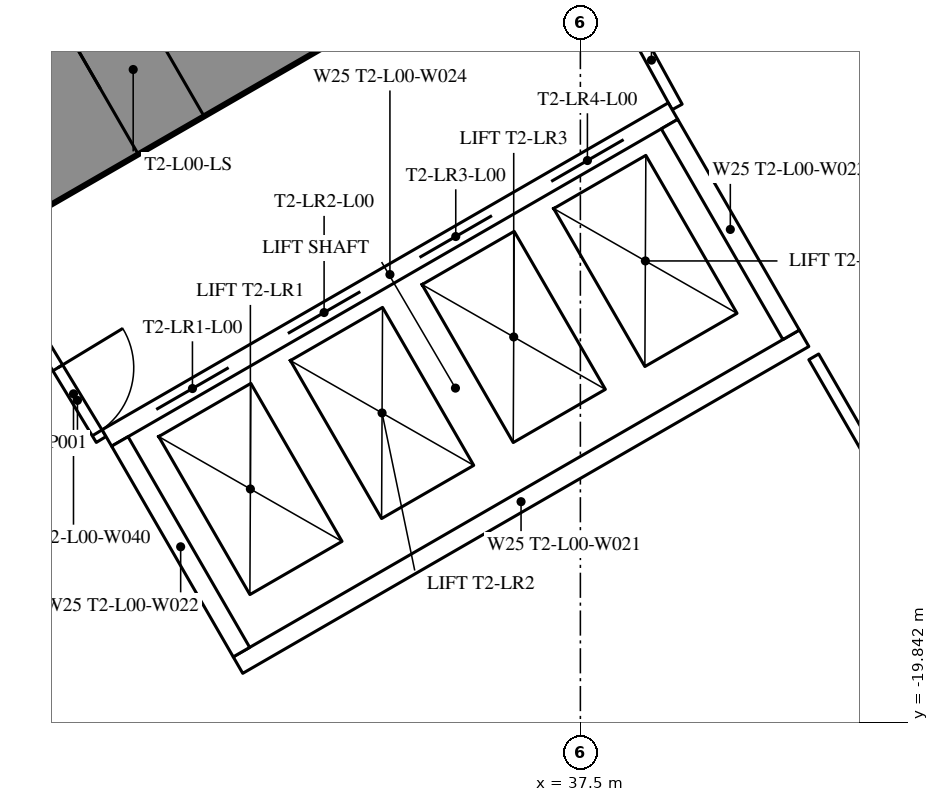
"""IFC4 building model, lengths in metres.
Left out: names, types, materials, properties, quantities, classifications, styles, units other than length and angle.
Written with IfcOpenShell. Run it as: python <this file> out.ifc"""

import sys

from ifc_helpers import new_model, si_unit, direction, frame, frame_2d, origin, place, context, subcontext, project, spatial, rectangle, extrude, element, fill, save


model = new_model("IFC4")
c1 = context("Model", 3, precision=1e-05, world=origin(), true_north=direction((0.0, 1.0)))
c2 = subcontext(c1, "Body", "Model", "MODEL_VIEW")
j1 = project(units=[si_unit("LENGTHUNIT", "METRE"), si_unit("PLANEANGLEUNIT", "RADIAN")], contexts=[c1])
p1 = place(None, origin())
s1 = spatial("IfcSite", under=j1, at=p1, CompositionType="ELEMENT")
p2 = place(p1, origin())
s2 = spatial("IfcBuilding", under=s1, at=p2, CompositionType="ELEMENT")
p3 = place(p2, origin())
s3 = spatial("IfcBuildingStorey", under=s2, at=p3, CompositionType="ELEMENT", Elevation=0.0)
p4 = place(p3, frame((27.2, -13.8, 0.0), z_axis=(0.0, 0.0, 1.0), x_axis=(0.866027159892, 0.499996958321, 0.0)))
e1 = element("IfcWall", 1, at=p4, inside=s3, PredefinedType="SHEAR", context=c2, shape_type="SweptSolid", body=[
    extrude(rectangle(XDim=27.947, YDim=2.0, at=frame_2d((13.973, 0.0))), origin(), (0.0, 0.0, 1.0), 7.2),
])
p5 = place(p4, frame((4.6, 0.0, 0.0)))
e2 = element("IfcOpeningElement", 2, at=p5, cuts=e1, PredefinedType="OPENING", context=c2, shape_type="SweptSolid", body=[
    extrude(rectangle(XDim=1.0, YDim=2.2, at=frame_2d((0.5, 1.1))), frame((0.0, 1.01, 0.0), z_axis=(0.0, -1.0, 0.0), x_axis=(1.0, 0.0, 0.0)), (0.0, 0.0, 1.0), 2.02),
])
p6 = place(p4, frame((13.395, 0.0, 0.0)))
e3 = element("IfcOpeningElement", 3, at=p6, cuts=e1, PredefinedType="OPENING", context=c2, shape_type="SweptSolid", body=[
    extrude(rectangle(XDim=1.8, YDim=2.2, at=frame_2d((0.9, 1.1))), frame((0.0, 1.01, 0.0), z_axis=(0.0, -1.0, 0.0), x_axis=(1.0, 0.0, 0.0)), (0.0, 0.0, 1.0), 2.02),
])
p7 = place(p3, frame((40.57, -15.03, 0.0), z_axis=(0.0, 0.0, 1.0), x_axis=(0.500012993597, -0.866017901798, 0.0)))
e4 = element("IfcWall", 4, at=p7, inside=s3, PredefinedType="PARTITIONING", context=c2, shape_type="SweptSolid", body=[
    extrude(rectangle(XDim=4.243, YDim=0.15, at=frame_2d((2.122, 0.0))), origin(), (0.0, 0.0, 1.0), 6.85),
])
p8 = place(p3, frame((27.5, -16.744, 0.0), z_axis=(0.0, 0.0, 1.0), x_axis=(0.866034395887, 0.499984424899, 0.0)))
e5 = element("IfcWall", 5, at=p8, inside=s3, PredefinedType="PARTITIONING", context=c2, shape_type="SweptSolid", body=[
    extrude(rectangle(XDim=3.469, YDim=0.2, at=frame_2d((1.734, 0.0))), origin(), (0.0, 0.0, 1.0), 6.85),
])
p9 = place(p3, frame((30.467, -14.916, 0.0), z_axis=(0.0, 0.0, 1.0), x_axis=(0.518297865337, -0.855200165334, 0.0)))
e6 = element("IfcWall", 6, at=p9, inside=s3, PredefinedType="PARTITIONING", context=c2, shape_type="SweptSolid", body=[
    extrude(rectangle(XDim=1.405, YDim=0.15, at=frame_2d((0.703, 0.0))), origin(), (0.0, 0.0, 1.0), 6.85),
])
p10 = place(p9, frame((0.303, 0.0, 0.0)))
e7 = element("IfcOpeningElement", 7, at=p10, cuts=e6, PredefinedType="OPENING", context=c2, shape_type="SweptSolid", body=[
    extrude(rectangle(XDim=1.0, YDim=2.2, at=frame_2d((0.5, 1.1))), frame((0.0, 0.085, 0.0), z_axis=(0.0, -1.0, 0.0), x_axis=(1.0, 0.0, 0.0)), (0.0, 0.0, 1.0), 0.17),
])
p11 = place(p3, frame((38.773, -11.742, 0.0), z_axis=(0.0, 0.0, 1.0), x_axis=(-0.481418475768, 0.876490873421, 0.0)))
e8 = element("IfcWall", 8, at=p11, inside=s3, PredefinedType="PARTITIONING", context=c2, shape_type="SweptSolid", body=[
    extrude(rectangle(XDim=1.405, YDim=0.15, at=frame_2d((0.703, 0.0))), origin(), (0.0, 0.0, 1.0), 6.85),
])
p12 = place(p3, frame((31.271, -16.097, 0.0), z_axis=(0.0, 0.0, 1.0), x_axis=(0.86604045752, 0.499973925258, 0.0)))
e9 = element("IfcWall", 9, at=p12, inside=s3, PredefinedType="PARTITIONING", context=c2, shape_type="SweptSolid", body=[
    extrude(rectangle(XDim=8.6, YDim=0.25, at=frame_2d((4.3, 0.0))), origin(), (0.0, 0.0, 1.0), 6.85),
])
p13 = place(p12, frame((0.75, 0.0, 0.0)))
e10 = element("IfcOpeningElement", 10, at=p13, cuts=e9, PredefinedType="OPENING", context=c2, shape_type="SweptSolid", body=[
    extrude(rectangle(XDim=1.1, YDim=2.2, at=frame_2d((0.55, 1.1))), frame((0.0, 0.135, 0.0), z_axis=(0.0, -1.0, 0.0), x_axis=(1.0, 0.0, 0.0)), (0.0, 0.0, 1.0), 0.27),
])
p14 = place(p12, frame((2.75, 0.0, 0.0)))
e11 = element("IfcOpeningElement", 11, at=p14, cuts=e9, PredefinedType="OPENING", context=c2, shape_type="SweptSolid", body=[
    extrude(rectangle(XDim=1.1, YDim=2.2, at=frame_2d((0.55, 1.1))), frame((0.0, 0.135, 0.0), z_axis=(0.0, -1.0, 0.0), x_axis=(1.0, 0.0, 0.0)), (0.0, 0.0, 1.0), 0.27),
])
p15 = place(p12, frame((4.75, 0.0, 0.0)))
e12 = element("IfcOpeningElement", 12, at=p15, cuts=e9, PredefinedType="OPENING", context=c2, shape_type="SweptSolid", body=[
    extrude(rectangle(XDim=1.1, YDim=2.2, at=frame_2d((0.55, 1.1))), frame((0.0, 0.135, 0.0), z_axis=(0.0, -1.0, 0.0), x_axis=(1.0, 0.0, 0.0)), (0.0, 0.0, 1.0), 0.27),
])
p16 = place(p12, frame((6.75, 0.0, 0.0)))
e13 = element("IfcOpeningElement", 13, at=p16, cuts=e9, PredefinedType="OPENING", context=c2, shape_type="SweptSolid", body=[
    extrude(rectangle(XDim=1.1, YDim=2.2, at=frame_2d((0.55, 1.1))), frame((0.0, 0.135, 0.0), z_axis=(0.0, -1.0, 0.0), x_axis=(1.0, 0.0, 0.0)), (0.0, 0.0, 1.0), 0.27),
])
p17 = place(p3, frame((32.996, -19.086, 0.0), z_axis=(0.0, 0.0, 1.0), x_axis=(0.866028165386, 0.499995216735, 0.0)))
e14 = element("IfcWall", 14, at=p17, inside=s3, PredefinedType="PARTITIONING", context=c2, shape_type="SweptSolid", body=[
    extrude(rectangle(XDim=8.6, YDim=0.25, at=frame_2d((4.3, 0.0))), origin(), (0.0, 0.0, 1.0), 6.85),
])
for number, where, z_axis, x_axis in (
    (15, (31.441, -16.143, 0.0), (0.0, 0.0, 1.0), (0.5, -0.866, 0.0)),
    (16, (38.673, -11.968, 0.0), (0.0, 0.0, 1.0), (0.5, -0.866, 0.0)),
):
    element("IfcWall", number, at=place(p3, frame(where, z_axis=z_axis, x_axis=x_axis)), inside=s3, PredefinedType="PARTITIONING", context=c2, shape_type="SweptSolid", body=[
        extrude(rectangle(XDim=3.201, YDim=0.25, at=frame_2d((1.6, 0.0))), origin(), (0.0, 0.0, 1.0), 6.85),
    ])
p18 = place(p10, origin())
e17 = element("IfcDoor", 17, at=p18, inside=s3, OperationType="SINGLE_SWING_LEFT", PredefinedType="DOOR", context=c2, shape_type="SweptSolid", body=[
    extrude(rectangle(XDim=1.0, YDim=2.2, at=frame_2d((0.5, 1.1))), frame((0.0, 0.025, 0.0), z_axis=(0.0, -1.0, 0.0), x_axis=(1.0, 0.0, 0.0)), (0.0, 0.0, 1.0), 0.05),
])
fill(e7, e17)
p19 = place(p5, origin())
e18 = element("IfcDoor", 18, at=p19, inside=s3, OperationType="SINGLE_SWING_LEFT", PredefinedType="DOOR", context=c2, shape_type="SweptSolid", body=[
    extrude(rectangle(XDim=1.0, YDim=2.2, at=frame_2d((0.5, 1.1))), frame((0.0, 0.025, 0.0), z_axis=(0.0, -1.0, 0.0), x_axis=(1.0, 0.0, 0.0)), (0.0, 0.0, 1.0), 0.05),
])
fill(e2, e18)
p20 = place(p13, origin())
e19 = element("IfcDoor", 19, at=p20, inside=s3, OperationType="DOUBLE_DOOR_SLIDING", PredefinedType="USERDEFINED", context=c2, shape_type="SweptSolid", body=[
    extrude(rectangle(XDim=1.1, YDim=2.2, at=frame_2d((0.55, 1.1))), frame((0.0, 0.025, 0.0), z_axis=(0.0, -1.0, 0.0), x_axis=(1.0, 0.0, 0.0)), (0.0, 0.0, 1.0), 0.05),
])
fill(e10, e19)
p21 = place(p14, origin())
e20 = element("IfcDoor", 20, at=p21, inside=s3, OperationType="DOUBLE_DOOR_SLIDING", PredefinedType="USERDEFINED", context=c2, shape_type="SweptSolid", body=[
    extrude(rectangle(XDim=1.1, YDim=2.2, at=frame_2d((0.55, 1.1))), frame((0.0, 0.025, 0.0), z_axis=(0.0, -1.0, 0.0), x_axis=(1.0, 0.0, 0.0)), (0.0, 0.0, 1.0), 0.05),
])
fill(e11, e20)
p22 = place(p15, origin())
e21 = element("IfcDoor", 21, at=p22, inside=s3, OperationType="DOUBLE_DOOR_SLIDING", PredefinedType="USERDEFINED", context=c2, shape_type="SweptSolid", body=[
    extrude(rectangle(XDim=1.1, YDim=2.2, at=frame_2d((0.55, 1.1))), frame((0.0, 0.025, 0.0), z_axis=(0.0, -1.0, 0.0), x_axis=(1.0, 0.0, 0.0)), (0.0, 0.0, 1.0), 0.05),
])
fill(e12, e21)
p23 = place(p16, origin())
e22 = element("IfcDoor", 22, at=p23, inside=s3, OperationType="DOUBLE_DOOR_SLIDING", PredefinedType="USERDEFINED", context=c2, shape_type="SweptSolid", body=[
    extrude(rectangle(XDim=1.1, YDim=2.2, at=frame_2d((0.55, 1.1))), frame((0.0, 0.025, 0.0), z_axis=(0.0, -1.0, 0.0), x_axis=(1.0, 0.0, 0.0)), (0.0, 0.0, 1.0), 0.05),
])
fill(e13, e22)
save(model, sys.argv[1])
